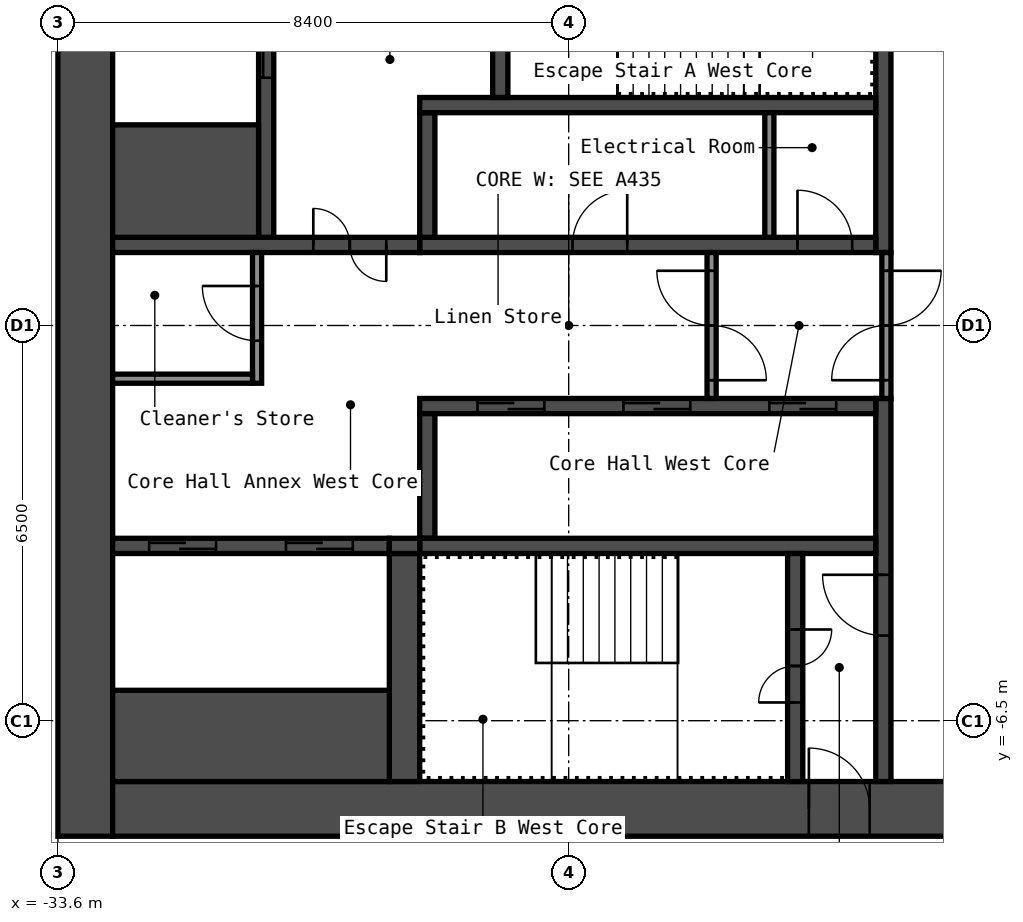
"""IFC4 building model, lengths in metres.
Left out: names, types, materials, properties, quantities, classifications, styles, units other than length and angle.
Written with IfcOpenShell. Run it as: python <this file> out.ifc"""

import sys

from ifc_helpers import new_model, si_unit, direction, frame, frame_2d, origin, place, context, subcontext, project, spatial, rectangle, extrude, element, fill, save


model = new_model("IFC4")
c1 = context("Model", 3, precision=1e-05, world=origin(), true_north=direction((0.0, 1.0)))
c2 = subcontext(c1, "Body", "Model", "MODEL_VIEW")
j1 = project(units=[si_unit("LENGTHUNIT", "METRE"), si_unit("PLANEANGLEUNIT", "RADIAN")], contexts=[c1])
p1 = place(None, origin())
s1 = spatial("IfcSite", under=j1, at=p1, CompositionType="ELEMENT")
p2 = place(p1, origin())
s2 = spatial("IfcBuilding", under=s1, at=p2, CompositionType="ELEMENT")
p3 = place(p2, frame((0.0, 0.0, 239.0)))
s3 = spatial("IfcBuildingStorey", under=s2, at=p3, CompositionType="ELEMENT", Elevation=239.0)
p4 = place(p3, frame((-33.15, -8.4, 0.0), z_axis=(0.0, 0.0, 1.0), x_axis=(0.0, 1.0, 0.0)))
e1 = element("IfcWall", 1, at=p4, inside=s3, PredefinedType="SHEAR", context=c2, shape_type="SweptSolid", body=[
    extrude(rectangle(XDim=16.8, YDim=0.9, at=frame_2d((8.4, 0.0))), origin(), (0.0, 0.0, 1.0), 2.75),
])
p5 = place(p3, frame((-32.7, -7.95, 0.0), z_axis=(0.0, 0.0, 1.0), x_axis=(1.0, 0.0, 0.0)))
e2 = element("IfcWall", 2, at=p5, inside=s3, PredefinedType="SHEAR", context=c2, shape_type="SweptSolid", body=[
    extrude(rectangle(XDim=15.0, YDim=0.9, at=frame_2d((7.5, 0.0))), origin(), (0.0, 0.0, 1.0), 2.75),
])
p6 = place(p5, frame((11.45, 0.0, 0.0)))
e3 = element("IfcOpeningElement", 3, at=p6, cuts=e2, PredefinedType="OPENING", context=c2, shape_type="SweptSolid", body=[
    extrude(rectangle(XDim=1.0, YDim=2.1, at=frame_2d((0.5, 1.05))), frame((0.0, 0.46, 0.0), z_axis=(0.0, -1.0, 0.0), x_axis=(1.0, 0.0, 0.0)), (0.0, 0.0, 1.0), 0.92),
])
p7 = place(p3, frame((-20.025, 1.2, 0.0), z_axis=(0.0, 0.0, 1.0), x_axis=(0.0, 1.0, 0.0)))
e4 = element("IfcWall", 4, at=p7, inside=s3, PredefinedType="SHEAR", context=c2, shape_type="SweptSolid", body=[
    extrude(rectangle(XDim=6.3, YDim=0.25, at=frame_2d((3.15, 0.0))), origin(), (0.0, 0.0, 1.0), 2.75),
])
p8 = place(p3, frame((-20.025, -7.5, 0.0), z_axis=(0.0, 0.0, 1.0), x_axis=(0.0, 1.0, 0.0)))
e5 = element("IfcWall", 5, at=p8, inside=s3, PredefinedType="SHEAR", context=c2, shape_type="SweptSolid", body=[
    extrude(rectangle(XDim=6.3, YDim=0.25, at=frame_2d((3.15, 0.0))), origin(), (0.0, 0.0, 1.0), 2.75),
])
p9 = place(p8, frame((2.4, 0.0, 0.0)))
e6 = element("IfcOpeningElement", 6, at=p9, cuts=e5, PredefinedType="OPENING", context=c2, shape_type="SweptSolid", body=[
    extrude(rectangle(XDim=1.0, YDim=2.1, at=frame_2d((0.5, 1.05))), frame((0.0, 0.135, 0.0), z_axis=(0.0, -1.0, 0.0), x_axis=(1.0, 0.0, 0.0)), (0.0, 0.0, 1.0), 0.27),
])
p10 = place(p3, frame((-27.65, 1.325, 0.0), z_axis=(0.0, 0.0, 1.0), x_axis=(1.0, 0.0, 0.0)))
e7 = element("IfcWall", 7, at=p10, inside=s3, PredefinedType="SHEAR", context=c2, shape_type="SweptSolid", body=[
    extrude(rectangle(XDim=7.5, YDim=0.25, at=frame_2d((3.75, 0.0))), origin(), (0.0, 0.0, 1.0), 2.75),
])
p11 = place(p10, frame((6.212, 0.0, 0.0)))
e8 = element("IfcOpeningElement", 8, at=p11, cuts=e7, PredefinedType="OPENING", context=c2, shape_type="SweptSolid", body=[
    extrude(rectangle(XDim=0.9, YDim=2.1, at=frame_2d((0.45, 1.05))), frame((0.0, 0.135, 0.0), z_axis=(0.0, -1.0, 0.0), x_axis=(1.0, 0.0, 0.0)), (0.0, 0.0, 1.0), 0.27),
])
p12 = place(p10, frame((2.512, 0.0, 0.0)))
e9 = element("IfcOpeningElement", 9, at=p12, cuts=e7, PredefinedType="OPENING", context=c2, shape_type="SweptSolid", body=[
    extrude(rectangle(XDim=0.9, YDim=2.1, at=frame_2d((0.45, 1.05))), frame((0.0, 0.135, 0.0), z_axis=(0.0, -1.0, 0.0), x_axis=(1.0, 0.0, 0.0)), (0.0, 0.0, 1.0), 0.27),
])
p13 = place(p3, frame((-27.525, 1.45, 0.0), z_axis=(0.0, 0.0, 1.0), x_axis=(0.0, 1.0, 0.0)))
e10 = element("IfcWall", 10, at=p13, inside=s3, PredefinedType="SHEAR", context=c2, shape_type="SweptSolid", body=[
    extrude(rectangle(XDim=2.05, YDim=0.25, at=frame_2d((1.025, 0.0))), origin(), (0.0, 0.0, 1.0), 2.75),
])
p14 = place(p3, frame((-27.65, 3.625, 0.0), z_axis=(0.0, 0.0, 1.0), x_axis=(1.0, 0.0, 0.0)))
e11 = element("IfcWall", 11, at=p14, inside=s3, PredefinedType="SHEAR", context=c2, shape_type="SweptSolid", body=[
    extrude(rectangle(XDim=7.5, YDim=0.25, at=frame_2d((3.75, 0.0))), origin(), (0.0, 0.0, 1.0), 2.75),
])
p15 = place(p3, frame((-26.325, 3.75, 0.0), z_axis=(0.0, 0.0, 1.0), x_axis=(0.0, 1.0, 0.0)))
e12 = element("IfcWall", 12, at=p15, inside=s3, PredefinedType="SHEAR", context=c2, shape_type="SweptSolid", body=[
    extrude(rectangle(XDim=3.75, YDim=0.25, at=frame_2d((1.875, 0.0))), origin(), (0.0, 0.0, 1.0), 2.75),
])
p16 = place(p15, frame((1.25, 0.0, 0.0)))
e13 = element("IfcOpeningElement", 13, at=p16, cuts=e12, PredefinedType="OPENING", context=c2, shape_type="SweptSolid", body=[
    extrude(rectangle(XDim=1.2, YDim=2.1, at=frame_2d((0.6, 1.05))), frame((0.0, 0.135, 0.0), z_axis=(0.0, -1.0, 0.0), x_axis=(1.0, 0.0, 0.0)), (0.0, 0.0, 1.0), 0.27),
])
p17 = place(p3, frame((-32.7, 1.325, 0.0), z_axis=(0.0, 0.0, 1.0), x_axis=(1.0, 0.0, 0.0)))
e14 = element("IfcWall", 14, at=p17, inside=s3, PredefinedType="SHEAR", context=c2, shape_type="SweptSolid", body=[
    extrude(rectangle(XDim=5.05, YDim=0.25, at=frame_2d((2.525, 0.0))), origin(), (0.0, 0.0, 1.0), 2.75),
])
p18 = place(p17, frame((3.3, 0.0, 0.0)))
e15 = element("IfcOpeningElement", 15, at=p18, cuts=e14, PredefinedType="OPENING", context=c2, shape_type="SweptSolid", body=[
    extrude(rectangle(XDim=1.2, YDim=2.1, at=frame_2d((0.6, 1.05))), frame((0.0, 0.135, 0.0), z_axis=(0.0, -1.0, 0.0), x_axis=(1.0, 0.0, 0.0)), (0.0, 0.0, 1.0), 0.27),
])
p19 = place(p3, frame((-30.175, 1.45, 0.0), z_axis=(0.0, 0.0, 1.0), x_axis=(0.0, 1.0, 0.0)))
e16 = element("IfcWall", 16, at=p19, inside=s3, PredefinedType="SHEAR", context=c2, shape_type="SweptSolid", body=[
    extrude(rectangle(XDim=6.05, YDim=0.25, at=frame_2d((3.025, 0.0))), origin(), (0.0, 0.0, 1.0), 2.75),
])
p20 = place(p19, frame((2.625, 0.0, 0.0)))
e17 = element("IfcOpeningElement", 17, at=p20, cuts=e16, PredefinedType="OPENING", context=c2, shape_type="SweptSolid", body=[
    extrude(rectangle(XDim=1.1, YDim=2.1, at=frame_2d((0.55, 1.05))), frame((0.0, 0.135, 0.0), z_axis=(0.0, -1.0, 0.0), x_axis=(1.0, 0.0, 0.0)), (0.0, 0.0, 1.0), 0.27),
])
p21 = place(p3, frame((-32.7, 2.375, 0.0), z_axis=(0.0, 0.0, 1.0), x_axis=(1.0, 0.0, 0.0)))
e18 = element("IfcWall", 18, at=p21, inside=s3, PredefinedType="SHEAR", context=c2, shape_type="SweptSolid", body=[
    extrude(rectangle(XDim=2.4, YDim=1.85, at=frame_2d((1.2, 0.0))), origin(), (0.0, 0.0, 1.0), 2.75),
])
p22 = place(p3, frame((-27.65, -1.325, 0.0), z_axis=(0.0, 0.0, 1.0), x_axis=(1.0, 0.0, 0.0)))
e19 = element("IfcWall", 19, at=p22, inside=s3, PredefinedType="SHEAR", context=c2, shape_type="SweptSolid", body=[
    extrude(rectangle(XDim=7.5, YDim=0.25, at=frame_2d((3.75, 0.0))), origin(), (0.0, 0.0, 1.0), 2.75),
])
p23 = place(p22, frame((5.75, 0.0, 0.0)))
e20 = element("IfcOpeningElement", 20, at=p23, cuts=e19, PredefinedType="OPENING", context=c2, shape_type="SweptSolid", body=[
    extrude(rectangle(XDim=1.1, YDim=2.1, at=frame_2d((0.55, 1.05))), frame((0.0, 0.135, 0.0), z_axis=(0.0, -1.0, 0.0), x_axis=(1.0, 0.0, 0.0)), (0.0, 0.0, 1.0), 0.27),
])
p24 = place(p22, frame((3.35, 0.0, 0.0)))
e21 = element("IfcOpeningElement", 21, at=p24, cuts=e19, PredefinedType="OPENING", context=c2, shape_type="SweptSolid", body=[
    extrude(rectangle(XDim=1.1, YDim=2.1, at=frame_2d((0.55, 1.05))), frame((0.0, 0.135, 0.0), z_axis=(0.0, -1.0, 0.0), x_axis=(1.0, 0.0, 0.0)), (0.0, 0.0, 1.0), 0.27),
])
p25 = place(p22, frame((0.95, 0.0, 0.0)))
e22 = element("IfcOpeningElement", 22, at=p25, cuts=e19, PredefinedType="OPENING", context=c2, shape_type="SweptSolid", body=[
    extrude(rectangle(XDim=1.1, YDim=2.1, at=frame_2d((0.55, 1.05))), frame((0.0, 0.135, 0.0), z_axis=(0.0, -1.0, 0.0), x_axis=(1.0, 0.0, 0.0)), (0.0, 0.0, 1.0), 0.27),
])
p26 = place(p3, frame((-27.525, -3.5, 0.0), z_axis=(0.0, 0.0, 1.0), x_axis=(0.0, 1.0, 0.0)))
e23 = element("IfcWall", 23, at=p26, inside=s3, PredefinedType="SHEAR", context=c2, shape_type="SweptSolid", body=[
    extrude(rectangle(XDim=2.05, YDim=0.25, at=frame_2d((1.025, 0.0))), origin(), (0.0, 0.0, 1.0), 2.75),
])
p27 = place(p3, frame((-27.65, -3.625, 0.0), z_axis=(0.0, 0.0, 1.0), x_axis=(1.0, 0.0, 0.0)))
e24 = element("IfcWall", 24, at=p27, inside=s3, PredefinedType="SHEAR", context=c2, shape_type="SweptSolid", body=[
    extrude(rectangle(XDim=7.5, YDim=0.25, at=frame_2d((3.75, 0.0))), origin(), (0.0, 0.0, 1.0), 2.75),
])
p28 = place(p3, frame((-21.475, -7.5, 0.0), z_axis=(0.0, 0.0, 1.0), x_axis=(0.0, 1.0, 0.0)))
e25 = element("IfcWall", 25, at=p28, inside=s3, PredefinedType="SHEAR", context=c2, shape_type="SweptSolid", body=[
    extrude(rectangle(XDim=3.75, YDim=0.25, at=frame_2d((1.875, 0.0))), origin(), (0.0, 0.0, 1.0), 2.75),
])
p29 = place(p28, frame((1.3, 0.0, 0.0)))
e26 = element("IfcOpeningElement", 26, at=p29, cuts=e25, PredefinedType="OPENING", context=c2, shape_type="SweptSolid", body=[
    extrude(rectangle(XDim=1.2, YDim=2.1, at=frame_2d((0.6, 1.05))), frame((0.0, 0.135, 0.0), z_axis=(0.0, -1.0, 0.0), x_axis=(1.0, 0.0, 0.0)), (0.0, 0.0, 1.0), 0.27),
])
p30 = place(p3, frame((-27.9, -7.5, 0.0), z_axis=(0.0, 0.0, 1.0), x_axis=(0.0, 1.0, 0.0)))
e27 = element("IfcWall", 27, at=p30, inside=s3, PredefinedType="SHEAR", context=c2, shape_type="SweptSolid", body=[
    extrude(rectangle(XDim=3.75, YDim=0.5, at=frame_2d((1.875, 0.0))), origin(), (0.0, 0.0, 1.0), 2.75),
])
p31 = place(p3, frame((-32.7, -3.625, 0.0), z_axis=(0.0, 0.0, 1.0), x_axis=(1.0, 0.0, 0.0)))
e28 = element("IfcWall", 28, at=p31, inside=s3, PredefinedType="SHEAR", context=c2, shape_type="SweptSolid", body=[
    extrude(rectangle(XDim=4.55, YDim=0.25, at=frame_2d((2.275, 0.0))), origin(), (0.0, 0.0, 1.0), 2.75),
])
p32 = place(p31, frame((2.85, 0.0, 0.0)))
e29 = element("IfcOpeningElement", 29, at=p32, cuts=e28, PredefinedType="OPENING", context=c2, shape_type="SweptSolid", body=[
    extrude(rectangle(XDim=1.1, YDim=2.1, at=frame_2d((0.55, 1.05))), frame((0.0, 0.135, 0.0), z_axis=(0.0, -1.0, 0.0), x_axis=(1.0, 0.0, 0.0)), (0.0, 0.0, 1.0), 0.27),
])
p33 = place(p31, frame((0.6, 0.0, 0.0)))
e30 = element("IfcOpeningElement", 30, at=p33, cuts=e28, PredefinedType="OPENING", context=c2, shape_type="SweptSolid", body=[
    extrude(rectangle(XDim=1.1, YDim=2.1, at=frame_2d((0.55, 1.05))), frame((0.0, 0.135, 0.0), z_axis=(0.0, -1.0, 0.0), x_axis=(1.0, 0.0, 0.0)), (0.0, 0.0, 1.0), 0.27),
])
p34 = place(p3, frame((-32.7, -6.75, 0.0), z_axis=(0.0, 0.0, 1.0), x_axis=(1.0, 0.0, 0.0)))
e31 = element("IfcWall", 31, at=p34, inside=s3, PredefinedType="SHEAR", context=c2, shape_type="SweptSolid", body=[
    extrude(rectangle(XDim=4.55, YDim=1.5, at=frame_2d((2.275, 0.0))), origin(), (0.0, 0.0, 1.0), 2.75),
])
p35 = place(p3, frame((-28.15, -3.625, 0.0), z_axis=(0.0, 0.0, 1.0), x_axis=(1.0, 0.0, 0.0)))
e32 = element("IfcWall", 32, at=p35, inside=s3, PredefinedType="SHEAR", context=c2, shape_type="SweptSolid", body=[
    extrude(rectangle(XDim=0.5, YDim=0.25, at=frame_2d((0.25, 0.0))), origin(), (0.0, 0.0, 1.0), 2.75),
])
p36 = place(p3, frame((-19.975, -1.2, 0.0), z_axis=(0.0, 0.0, 1.0), x_axis=(0.0, 1.0, 0.0)))
e33 = element("IfcWall", 33, at=p36, inside=s3, PredefinedType="PARTITIONING", context=c2, shape_type="SweptSolid", body=[
    extrude(rectangle(XDim=2.4, YDim=0.15, at=frame_2d((1.2, 0.0))), origin(), (0.0, 0.0, 1.0), 2.75),
])
p37 = place(p36, frame((0.3, 0.0, 0.0)))
e34 = element("IfcOpeningElement", 34, at=p37, cuts=e33, PredefinedType="OPENING", context=c2, shape_type="SweptSolid", body=[
    extrude(rectangle(XDim=1.8, YDim=2.1, at=frame_2d((0.9, 1.05))), frame((0.0, 0.085, 0.0), z_axis=(0.0, -1.0, 0.0), x_axis=(1.0, 0.0, 0.0)), (0.0, 0.0, 1.0), 0.17),
])
p38 = place(p3, frame((-22.85, -1.2, 0.0), z_axis=(0.0, 0.0, 1.0), x_axis=(0.0, 1.0, 0.0)))
e35 = element("IfcWall", 35, at=p38, inside=s3, PredefinedType="PARTITIONING", context=c2, shape_type="SweptSolid", body=[
    extrude(rectangle(XDim=2.4, YDim=0.15, at=frame_2d((1.2, 0.0))), origin(), (0.0, 0.0, 1.0), 2.75),
])
p39 = place(p38, frame((0.3, 0.0, 0.0)))
e36 = element("IfcOpeningElement", 36, at=p39, cuts=e35, PredefinedType="OPENING", context=c2, shape_type="SweptSolid", body=[
    extrude(rectangle(XDim=1.8, YDim=2.1, at=frame_2d((0.9, 1.05))), frame((0.0, 0.085, 0.0), z_axis=(0.0, -1.0, 0.0), x_axis=(1.0, 0.0, 0.0)), (0.0, 0.0, 1.0), 0.17),
])
p40 = place(p3, frame((-30.325, -0.95, 0.0), z_axis=(0.0, 0.0, 1.0), x_axis=(0.0, 1.0, 0.0)))
e37 = element("IfcWall", 37, at=p40, inside=s3, PredefinedType="PARTITIONING", context=c2, shape_type="SweptSolid", body=[
    extrude(rectangle(XDim=2.15, YDim=0.15, at=frame_2d((1.075, 0.0))), origin(), (0.0, 0.0, 1.0), 2.75),
])
p41 = place(p40, frame((0.7, 0.0, 0.0)))
e38 = element("IfcOpeningElement", 38, at=p41, cuts=e37, PredefinedType="OPENING", context=c2, shape_type="SweptSolid", body=[
    extrude(rectangle(XDim=0.9, YDim=2.1, at=frame_2d((0.45, 1.05))), frame((0.0, 0.085, 0.0), z_axis=(0.0, -1.0, 0.0), x_axis=(1.0, 0.0, 0.0)), (0.0, 0.0, 1.0), 0.17),
])
p42 = place(p3, frame((-32.7, -0.875, 0.0), z_axis=(0.0, 0.0, 1.0), x_axis=(1.0, 0.0, 0.0)))
e39 = element("IfcWall", 39, at=p42, inside=s3, PredefinedType="PARTITIONING", context=c2, shape_type="SweptSolid", body=[
    extrude(rectangle(XDim=2.3, YDim=0.15, at=frame_2d((1.15, 0.0))), origin(), (0.0, 0.0, 1.0), 2.75),
])
p43 = place(p3, frame((-21.9, 1.45, 0.0), z_axis=(0.0, 0.0, 1.0), x_axis=(0.0, 1.0, 0.0)))
e40 = element("IfcWall", 40, at=p43, inside=s3, PredefinedType="PARTITIONING", context=c2, shape_type="SweptSolid", body=[
    extrude(rectangle(XDim=2.05, YDim=0.15, at=frame_2d((1.025, 0.0))), origin(), (0.0, 0.0, 1.0), 2.75),
])
p44 = place(p6, origin())
e41 = element("IfcDoor", 41, at=p44, inside=s3, OperationType="SINGLE_SWING_RIGHT", PredefinedType="DOOR", context=c2, shape_type="SweptSolid", body=[
    extrude(rectangle(XDim=1.0, YDim=2.1, at=frame_2d((0.5, 1.05))), frame((0.0, 0.025, 0.0), z_axis=(0.0, -1.0, 0.0), x_axis=(1.0, 0.0, 0.0)), (0.0, 0.0, 1.0), 0.05),
])
fill(e3, e41)
p45 = place(p29, origin())
e42 = element("IfcDoor", 42, at=p45, inside=s3, OperationType="DOUBLE_DOOR_SINGLE_SWING", PredefinedType="DOOR", context=c2, shape_type="SweptSolid", body=[
    extrude(rectangle(XDim=1.2, YDim=2.1, at=frame_2d((0.6, 1.05))), frame((0.0, 0.025, 0.0), z_axis=(0.0, -1.0, 0.0), x_axis=(1.0, 0.0, 0.0)), (0.0, 0.0, 1.0), 0.05),
])
fill(e26, e42)
p46 = place(p9, origin())
e43 = element("IfcDoor", 43, at=p46, inside=s3, OperationType="SINGLE_SWING_LEFT", PredefinedType="DOOR", context=c2, shape_type="SweptSolid", body=[
    extrude(rectangle(XDim=1.0, YDim=2.1, at=frame_2d((0.5, 1.05))), frame((0.0, 0.025, 0.0), z_axis=(0.0, -1.0, 0.0), x_axis=(1.0, 0.0, 0.0)), (0.0, 0.0, 1.0), 0.05),
])
fill(e6, e43)
p47 = place(p18, origin())
e44 = element("IfcDoor", 44, at=p47, inside=s3, OperationType="DOUBLE_DOOR_SINGLE_SWING", PredefinedType="DOOR", context=c2, shape_type="SweptSolid", body=[
    extrude(rectangle(XDim=1.2, YDim=2.1, at=frame_2d((0.6, 1.05))), frame((0.0, 0.025, 0.0), z_axis=(0.0, -1.0, 0.0), x_axis=(1.0, 0.0, 0.0)), (0.0, 0.0, 1.0), 0.05),
])
fill(e15, e44)
p48 = place(p37, origin())
e45 = element("IfcDoor", 45, at=p48, inside=s3, OperationType="DOUBLE_DOOR_SINGLE_SWING", PredefinedType="DOOR", context=c2, shape_type="SweptSolid", body=[
    extrude(rectangle(XDim=1.8, YDim=2.1, at=frame_2d((0.9, 1.05))), frame((0.0, 0.025, 0.0), z_axis=(0.0, -1.0, 0.0), x_axis=(1.0, 0.0, 0.0)), (0.0, 0.0, 1.0), 0.05),
])
fill(e34, e45)
p49 = place(p39, origin())
e46 = element("IfcDoor", 46, at=p49, inside=s3, OperationType="DOUBLE_DOOR_SINGLE_SWING", PredefinedType="DOOR", context=c2, shape_type="SweptSolid", body=[
    extrude(rectangle(XDim=1.8, YDim=2.1, at=frame_2d((0.9, 1.05))), frame((0.0, 0.025, 0.0), z_axis=(0.0, -1.0, 0.0), x_axis=(1.0, 0.0, 0.0)), (0.0, 0.0, 1.0), 0.05),
])
fill(e36, e46)
p50 = place(p41, origin())
e47 = element("IfcDoor", 47, at=p50, inside=s3, OperationType="SINGLE_SWING_LEFT", PredefinedType="DOOR", context=c2, shape_type="SweptSolid", body=[
    extrude(rectangle(XDim=0.9, YDim=2.1, at=frame_2d((0.45, 1.05))), frame((0.0, 0.025, 0.0), z_axis=(0.0, -1.0, 0.0), x_axis=(1.0, 0.0, 0.0)), (0.0, 0.0, 1.0), 0.05),
])
fill(e38, e47)
p51 = place(p11, origin())
e48 = element("IfcDoor", 48, at=p51, inside=s3, OperationType="SINGLE_SWING_RIGHT", PredefinedType="DOOR", context=c2, shape_type="SweptSolid", body=[
    extrude(rectangle(XDim=0.9, YDim=2.1, at=frame_2d((0.45, 1.05))), frame((0.0, 0.025, 0.0), z_axis=(0.0, -1.0, 0.0), x_axis=(1.0, 0.0, 0.0)), (0.0, 0.0, 1.0), 0.05),
])
fill(e8, e48)
p52 = place(p12, origin())
e49 = element("IfcDoor", 49, at=p52, inside=s3, OperationType="SINGLE_SWING_LEFT", PredefinedType="DOOR", context=c2, shape_type="SweptSolid", body=[
    extrude(rectangle(XDim=0.9, YDim=2.1, at=frame_2d((0.45, 1.05))), frame((0.0, 0.025, 0.0), z_axis=(0.0, -1.0, 0.0), x_axis=(1.0, 0.0, 0.0)), (0.0, 0.0, 1.0), 0.05),
])
fill(e9, e49)
p53 = place(p23, origin())
e50 = element("IfcDoor", 50, at=p53, inside=s3, OperationType="DOUBLE_DOOR_SLIDING", PredefinedType="DOOR", context=c2, shape_type="SweptSolid", body=[
    extrude(rectangle(XDim=1.1, YDim=2.1, at=frame_2d((0.55, 1.05))), frame((0.0, 0.025, 0.0), z_axis=(0.0, -1.0, 0.0), x_axis=(1.0, 0.0, 0.0)), (0.0, 0.0, 1.0), 0.05),
])
fill(e20, e50)
p54 = place(p24, origin())
e51 = element("IfcDoor", 51, at=p54, inside=s3, OperationType="DOUBLE_DOOR_SLIDING", PredefinedType="DOOR", context=c2, shape_type="SweptSolid", body=[
    extrude(rectangle(XDim=1.1, YDim=2.1, at=frame_2d((0.55, 1.05))), frame((0.0, 0.025, 0.0), z_axis=(0.0, -1.0, 0.0), x_axis=(1.0, 0.0, 0.0)), (0.0, 0.0, 1.0), 0.05),
])
fill(e21, e51)
p55 = place(p25, origin())
e52 = element("IfcDoor", 52, at=p55, inside=s3, OperationType="DOUBLE_DOOR_SLIDING", PredefinedType="DOOR", context=c2, shape_type="SweptSolid", body=[
    extrude(rectangle(XDim=1.1, YDim=2.1, at=frame_2d((0.55, 1.05))), frame((0.0, 0.025, 0.0), z_axis=(0.0, -1.0, 0.0), x_axis=(1.0, 0.0, 0.0)), (0.0, 0.0, 1.0), 0.05),
])
fill(e22, e52)
p56 = place(p20, origin())
e53 = element("IfcDoor", 53, at=p56, inside=s3, OperationType="DOUBLE_DOOR_SLIDING", PredefinedType="DOOR", context=c2, shape_type="SweptSolid", body=[
    extrude(rectangle(XDim=1.1, YDim=2.1, at=frame_2d((0.55, 1.05))), frame((0.0, 0.025, 0.0), z_axis=(0.0, -1.0, 0.0), x_axis=(1.0, 0.0, 0.0)), (0.0, 0.0, 1.0), 0.05),
])
fill(e17, e53)
p57 = place(p32, origin())
e54 = element("IfcDoor", 54, at=p57, inside=s3, OperationType="DOUBLE_DOOR_SLIDING", PredefinedType="DOOR", context=c2, shape_type="SweptSolid", body=[
    extrude(rectangle(XDim=1.1, YDim=2.1, at=frame_2d((0.55, 1.05))), frame((0.0, 0.025, 0.0), z_axis=(0.0, -1.0, 0.0), x_axis=(1.0, 0.0, 0.0)), (0.0, 0.0, 1.0), 0.05),
])
fill(e29, e54)
p58 = place(p33, origin())
e55 = element("IfcDoor", 55, at=p58, inside=s3, OperationType="DOUBLE_DOOR_SLIDING", PredefinedType="DOOR", context=c2, shape_type="SweptSolid", body=[
    extrude(rectangle(XDim=1.1, YDim=2.1, at=frame_2d((0.55, 1.05))), frame((0.0, 0.025, 0.0), z_axis=(0.0, -1.0, 0.0), x_axis=(1.0, 0.0, 0.0)), (0.0, 0.0, 1.0), 0.05),
])
fill(e30, e55)
save(model, sys.argv[1])
